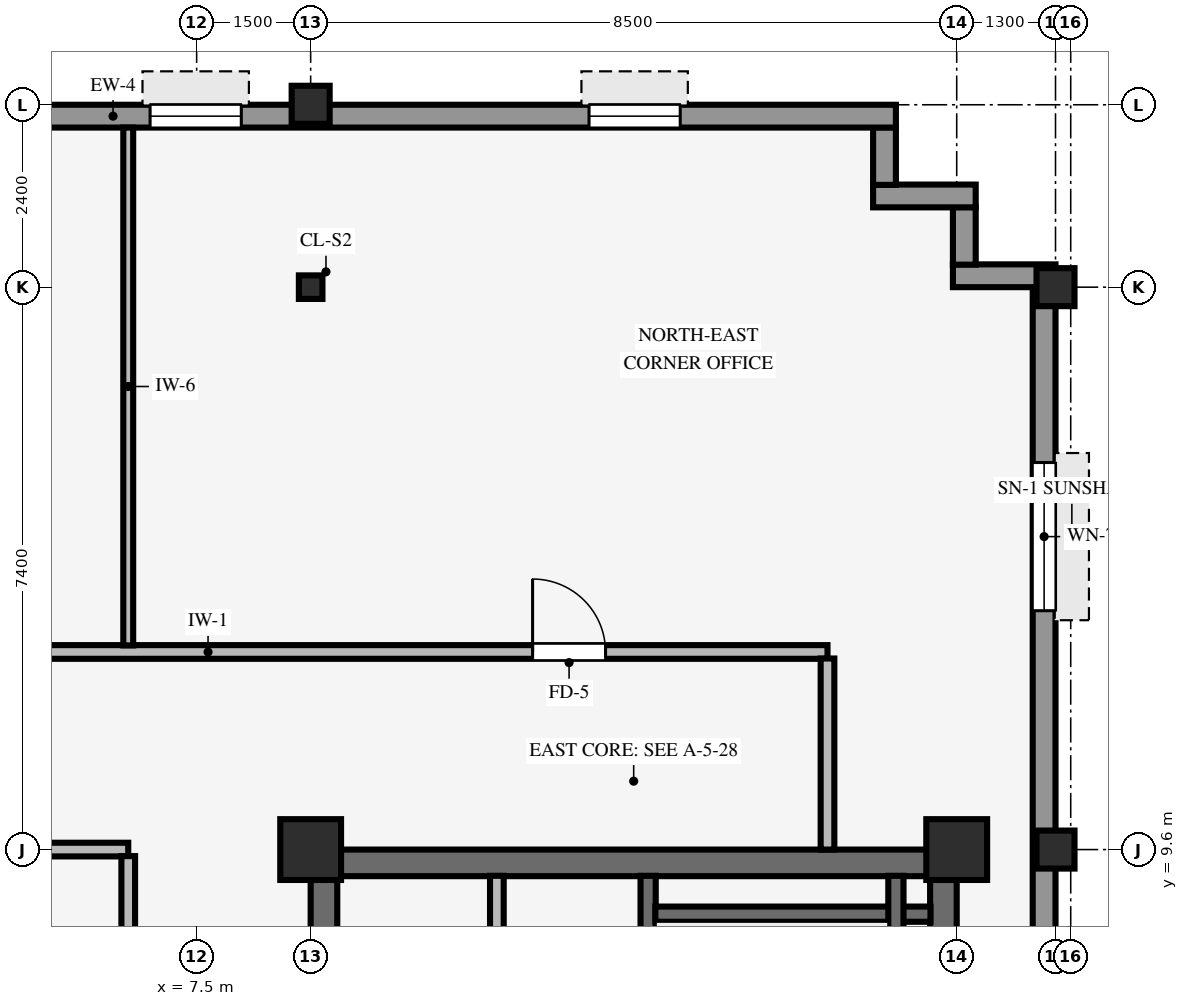
"""IFC4 building model, lengths in metres.
Left out: names, types, materials, properties, quantities, classifications, styles, units other than length and angle.
Written with IfcOpenShell. Run it as: python <this file> out.ifc"""

import sys

from ifc_helpers import new_model, si_unit, direction, frame, frame_2d, origin, origin_2d, place, context, subcontext, project, spatial, rectangle, hollow_rectangle, i_section, extrude, source, transform, mapped, element, fill, save


model = new_model("IFC4")
c1 = context("Model", 3, precision=1e-05, world=origin(), true_north=direction((0.0, 1.0)))
c2 = subcontext(c1, "Body", "Model", "MODEL_VIEW")
j1 = project(units=[si_unit("LENGTHUNIT", "METRE"), si_unit("PLANEANGLEUNIT", "RADIAN")], contexts=[c1])
p1 = place(None, origin())
s1 = spatial("IfcSite", under=j1, at=p1, CompositionType="ELEMENT")
p2 = place(p1, origin())
s2 = spatial("IfcBuilding", under=s1, at=p2, CompositionType="ELEMENT")
p3 = place(p2, frame((0.0, 0.0, 242.0)))
s3 = spatial("IfcBuildingStorey", under=s2, at=p3, CompositionType="ELEMENT", Elevation=242.0)
p4 = place(p3, frame((9.0, 9.425, 0.0), z_axis=(0.0, 0.0, 1.0), x_axis=(1.0, 0.0, 0.0)))
e1 = element("IfcWall", 1, at=p4, inside=s3, PredefinedType="SHEAR", context=c2, shape_type="SweptSolid", body=[
    extrude(rectangle(XDim=8.5, YDim=0.35, at=frame_2d((4.25, 0.0))), origin(), (0.0, 0.0, 1.0), 3.25),
])
p5 = place(p3, frame((9.175, -9.255, 0.0), z_axis=(0.0, 0.0, 1.0), x_axis=(0.0, 1.0, 0.0)))
e2 = element("IfcWall", 2, at=p5, inside=s3, PredefinedType="SHEAR", context=c2, shape_type="SweptSolid", body=[
    extrude(rectangle(XDim=18.51, YDim=0.35, at=frame_2d((9.255, 0.0))), origin(), (0.0, 0.0, 1.0), 3.25),
])
p6 = place(p5, frame((8.655, 0.0, 0.0)))
e3 = element("IfcOpeningElement", 3, at=p6, cuts=e2, PredefinedType="OPENING", context=c2, shape_type="SweptSolid", body=[
    extrude(rectangle(XDim=1.2, YDim=2.15, at=frame_2d((0.6, 1.075))), frame((0.0, 0.185, 0.0), z_axis=(0.0, -1.0, 0.0), x_axis=(1.0, 0.0, 0.0)), (0.0, 0.0, 1.0), 0.37),
])
p7 = place(p3, frame((17.325, -9.255, 0.0), z_axis=(0.0, 0.0, 1.0), x_axis=(0.0, 1.0, 0.0)))
e4 = element("IfcWall", 4, at=p7, inside=s3, PredefinedType="SHEAR", context=c2, shape_type="SweptSolid", body=[
    extrude(rectangle(XDim=18.51, YDim=0.35, at=frame_2d((9.255, 0.0))), origin(), (0.0, 0.0, 1.0), 3.25),
])
for number, where, z_axis, x_axis in (
    (5, (9.0, 9.6, 0.0), (0.0, 0.0, 1.0), (1.0, 0.0, 0.0)),
    (6, (17.5, 9.6, 0.0), (0.0, 0.0, 1.0), (1.0, 0.0, 0.0)),
):
    element("IfcColumn", number, at=place(p3, frame(where, z_axis=z_axis, x_axis=x_axis)), inside=s3, PredefinedType="COLUMN", context=c2, shape_type="SweptSolid", body=[
        extrude(rectangle(XDim=0.8, YDim=0.8, at=origin_2d()), origin(), (0.0, 0.0, 1.0), 3.25),
    ])
for number, where, z_axis, x_axis in (
    (7, (18.8, 9.6, 0.0), (0.0, 0.0, 1.0), (1.0, 0.0, 0.0)),
    (8, (18.8, 17.0, 0.0), (0.0, 0.0, 1.0), (1.0, 0.0, 0.0)),
    (9, (9.0, 19.4, 0.0), (0.0, 0.0, 1.0), (1.0, 0.0, 0.0)),
):
    element("IfcColumn", number, at=place(p3, frame(where, z_axis=z_axis, x_axis=x_axis)), inside=s3, PredefinedType="COLUMN", context=c2, shape_type="SweptSolid", body=[
        extrude(hollow_rectangle(XDim=0.5, YDim=0.5, WallThickness=0.032, InnerFilletRadius=0.032, OuterFilletRadius=0.064, at=origin_2d()), origin(), (0.0, 0.0, 1.0), 3.25),
    ])
p8 = place(p3, frame((9.0, 17.0, 0.0), z_axis=(0.0, 0.0, 1.0), x_axis=(1.0, 0.0, 0.0)))
e10 = element("IfcColumn", 10, at=p8, inside=s3, PredefinedType="COLUMN", context=c2, shape_type="SweptSolid", body=[
    extrude(i_section(OverallWidth=0.31, OverallDepth=0.31, WebThickness=0.015, FlangeThickness=0.015, FilletRadius=0.015, at=origin_2d()), origin(), (0.0, 0.0, 1.0), 3.25),
])
p9 = place(p3, frame((18.65, -17.004, 0.0), z_axis=(0.0, 0.0, 1.0), x_axis=(0.0, 1.0, 0.0)))
e11 = element("IfcWall", 11, at=p9, inside=s3, PredefinedType="STANDARD", context=c2, shape_type="SweptSolid", body=[
    extrude(rectangle(XDim=34.008, YDim=0.3, at=frame_2d((17.004, 0.0))), origin(), (0.0, 0.0, 1.0), 2.585),
])
p10 = place(p9, frame((2.311, 0.0, 0.8)))
e12 = element("IfcOpeningElement", 12, at=p10, cuts=e11, PredefinedType="OPENING", context=c2, shape_type="SweptSolid", body=[
    extrude(rectangle(XDim=1.95, YDim=1.48, at=frame_2d((0.975, 0.74))), frame((0.0, 0.16, 0.0), z_axis=(0.0, -1.0, 0.0), x_axis=(1.0, 0.0, 0.0)), (0.0, 0.0, 1.0), 0.32),
])
p11 = place(p9, frame((29.747, 0.0, 0.8)))
e13 = element("IfcOpeningElement", 13, at=p11, cuts=e11, PredefinedType="OPENING", context=c2, shape_type="SweptSolid", body=[
    extrude(rectangle(XDim=1.95, YDim=1.48, at=frame_2d((0.975, 0.74))), frame((0.0, 0.16, 0.0), z_axis=(0.0, -1.0, 0.0), x_axis=(1.0, 0.0, 0.0)), (0.0, 0.0, 1.0), 0.32),
])
p12 = place(p3, frame((17.45, 17.15, 0.0), z_axis=(0.0, 0.0, 1.0), x_axis=(1.0, 0.0, 0.0)))
e14 = element("IfcWall", 14, at=p12, inside=s3, PredefinedType="STANDARD", context=c2, shape_type="SweptSolid", body=[
    extrude(rectangle(XDim=1.35, YDim=0.3, at=frame_2d((0.675, 0.0))), origin(), (0.0, 0.0, 1.0), 2.772),
])
p13 = place(p3, frame((17.6, 17.296, 0.0), z_axis=(0.0, 0.0, 1.0), x_axis=(0.0, 1.0, 0.0)))
e15 = element("IfcWall", 15, at=p13, inside=s3, PredefinedType="STANDARD", context=c2, shape_type="SweptSolid", body=[
    extrude(rectangle(XDim=0.758, YDim=0.3, at=frame_2d((0.379, 0.0))), origin(), (0.0, 0.0, 1.0), 2.772),
])
p14 = place(p3, frame((16.4, 18.2, 0.0), z_axis=(0.0, 0.0, 1.0), x_axis=(1.0, 0.0, 0.0)))
e16 = element("IfcWall", 16, at=p14, inside=s3, PredefinedType="STANDARD", context=c2, shape_type="SweptSolid", body=[
    extrude(rectangle(XDim=1.35, YDim=0.3, at=frame_2d((0.675, 0.0))), origin(), (0.0, 0.0, 1.0), 2.772),
])
p15 = place(p3, frame((16.55, 18.346, 0.0), z_axis=(0.0, 0.0, 1.0), x_axis=(0.0, 1.0, 0.0)))
e17 = element("IfcWall", 17, at=p15, inside=s3, PredefinedType="STANDARD", context=c2, shape_type="SweptSolid", body=[
    extrude(rectangle(XDim=0.758, YDim=0.3, at=frame_2d((0.379, 0.0))), origin(), (0.0, 0.0, 1.0), 2.772),
])
p16 = place(p3, frame((-24.3, 19.25, 0.0), z_axis=(0.0, 0.0, 1.0), x_axis=(1.0, 0.0, 0.0)))
e18 = element("IfcWall", 18, at=p16, inside=s3, PredefinedType="STANDARD", context=c2, shape_type="SweptSolid", body=[
    extrude(rectangle(XDim=41.0, YDim=0.3, at=frame_2d((20.5, 0.0))), origin(), (0.0, 0.0, 1.0), 2.585),
])
p17 = place(p16, frame((18.9, 0.0, 0.0)))
e19 = element("IfcOpeningElement", 19, at=p17, cuts=e18, PredefinedType="OPENING", context=c2, shape_type="SweptSolid", body=[
    extrude(rectangle(XDim=1.05, YDim=2.1, at=frame_2d((0.525, 1.05))), frame((0.0, 0.16, 0.0), z_axis=(0.0, -1.0, 0.0), x_axis=(1.0, 0.0, 0.0)), (0.0, 0.0, 1.0), 0.32),
])
p18 = place(p16, frame((2.837, 0.0, 0.8)))
e20 = element("IfcOpeningElement", 20, at=p18, cuts=e18, PredefinedType="OPENING", context=c2, shape_type="SweptSolid", body=[
    extrude(rectangle(XDim=1.2, YDim=1.48, at=frame_2d((0.6, 0.74))), frame((0.0, 0.16, 0.0), z_axis=(0.0, -1.0, 0.0), x_axis=(1.0, 0.0, 0.0)), (0.0, 0.0, 1.0), 0.32),
])
p19 = place(p16, frame((7.712, 0.0, 0.8)))
e21 = element("IfcOpeningElement", 21, at=p19, cuts=e18, PredefinedType="OPENING", context=c2, shape_type="SweptSolid", body=[
    extrude(rectangle(XDim=1.2, YDim=1.48, at=frame_2d((0.6, 0.74))), frame((0.0, 0.16, 0.0), z_axis=(0.0, -1.0, 0.0), x_axis=(1.0, 0.0, 0.0)), (0.0, 0.0, 1.0), 0.32),
])
p20 = place(p16, frame((12.587, 0.0, 0.8)))
e22 = element("IfcOpeningElement", 22, at=p20, cuts=e18, PredefinedType="OPENING", context=c2, shape_type="SweptSolid", body=[
    extrude(rectangle(XDim=1.2, YDim=1.48, at=frame_2d((0.6, 0.74))), frame((0.0, 0.16, 0.0), z_axis=(0.0, -1.0, 0.0), x_axis=(1.0, 0.0, 0.0)), (0.0, 0.0, 1.0), 0.32),
])
p21 = place(p16, frame((16.113, 0.0, 0.8)))
e23 = element("IfcOpeningElement", 23, at=p21, cuts=e18, PredefinedType="OPENING", context=c2, shape_type="SweptSolid", body=[
    extrude(rectangle(XDim=1.2, YDim=1.48, at=frame_2d((0.6, 0.74))), frame((0.0, 0.16, 0.0), z_axis=(0.0, -1.0, 0.0), x_axis=(1.0, 0.0, 0.0)), (0.0, 0.0, 1.0), 0.32),
])
p22 = place(p16, frame((21.887, 0.0, 0.8)))
e24 = element("IfcOpeningElement", 24, at=p22, cuts=e18, PredefinedType="OPENING", context=c2, shape_type="SweptSolid", body=[
    extrude(rectangle(XDim=1.2, YDim=1.48, at=frame_2d((0.6, 0.74))), frame((0.0, 0.16, 0.0), z_axis=(0.0, -1.0, 0.0), x_axis=(1.0, 0.0, 0.0)), (0.0, 0.0, 1.0), 0.32),
])
p23 = place(p16, frame((27.212, 0.0, 0.8)))
e25 = element("IfcOpeningElement", 25, at=p23, cuts=e18, PredefinedType="OPENING", context=c2, shape_type="SweptSolid", body=[
    extrude(rectangle(XDim=1.2, YDim=1.48, at=frame_2d((0.6, 0.74))), frame((0.0, 0.16, 0.0), z_axis=(0.0, -1.0, 0.0), x_axis=(1.0, 0.0, 0.0)), (0.0, 0.0, 1.0), 0.32),
])
p24 = place(p16, frame((31.188, 0.0, 0.8)))
e26 = element("IfcOpeningElement", 26, at=p24, cuts=e18, PredefinedType="OPENING", context=c2, shape_type="SweptSolid", body=[
    extrude(rectangle(XDim=1.2, YDim=1.48, at=frame_2d((0.6, 0.74))), frame((0.0, 0.16, 0.0), z_axis=(0.0, -1.0, 0.0), x_axis=(1.0, 0.0, 0.0)), (0.0, 0.0, 1.0), 0.32),
])
p25 = place(p16, frame((36.962, 0.0, 0.8)))
e27 = element("IfcOpeningElement", 27, at=p25, cuts=e18, PredefinedType="OPENING", context=c2, shape_type="SweptSolid", body=[
    extrude(rectangle(XDim=1.2, YDim=1.48, at=frame_2d((0.6, 0.74))), frame((0.0, 0.16, 0.0), z_axis=(0.0, -1.0, 0.0), x_axis=(1.0, 0.0, 0.0)), (0.0, 0.0, 1.0), 0.32),
])
p26 = place(p3, frame((13.44, 0.9, 0.0), z_axis=(0.0, 0.0, 1.0), x_axis=(0.0, 1.0, 0.0)))
e28 = element("IfcWall", 28, at=p26, inside=s3, PredefinedType="SHEAR", context=c2, shape_type="SweptSolid", body=[
    extrude(rectangle(XDim=8.355, YDim=0.2, at=frame_2d((4.177, 0.0))), origin(), (0.0, 0.0, 1.0), 3.25),
])
p27 = place(p26, frame((0.43, 0.0, 0.0)))
e29 = element("IfcOpeningElement", 29, at=p27, cuts=e28, PredefinedType="OPENING", context=c2, shape_type="SweptSolid", body=[
    extrude(rectangle(XDim=1.1, YDim=2.15, at=frame_2d((0.55, 1.075))), frame((0.0, 0.11, 0.0), z_axis=(0.0, -1.0, 0.0), x_axis=(1.0, 0.0, 0.0)), (0.0, 0.0, 1.0), 0.22),
])
p28 = place(p3, frame((13.535, 8.75, 0.0), z_axis=(0.0, 0.0, 1.0), x_axis=(1.0, 0.0, 0.0)))
e30 = element("IfcWall", 30, at=p28, inside=s3, PredefinedType="SHEAR", context=c2, shape_type="SweptSolid", body=[
    extrude(rectangle(XDim=3.62, YDim=0.2, at=frame_2d((1.81, 0.0))), origin(), (0.0, 0.0, 1.0), 3.25),
])
p29 = place(p3, frame((16.7, 1.095, 0.0), z_axis=(0.0, 0.0, 1.0), x_axis=(0.0, 1.0, 0.0)))
e31 = element("IfcWall", 31, at=p29, inside=s3, PredefinedType="SHEAR", context=c2, shape_type="SweptSolid", body=[
    extrude(rectangle(XDim=8.16, YDim=0.2, at=frame_2d((4.08, 0.0))), origin(), (0.0, 0.0, 1.0), 3.25),
])
p30 = place(p3, frame((11.45, 4.19, 0.0), z_axis=(0.0, 0.0, 1.0), x_axis=(0.0, 1.0, 0.0)))
e32 = element("IfcWall", 32, at=p30, inside=s3, PredefinedType="PARTITIONING", context=c2, shape_type="SweptSolid", body=[
    extrude(rectangle(XDim=5.065, YDim=0.18, at=frame_2d((2.532, 0.0))), origin(), (0.0, 0.0, 1.0), 3.24),
])
p31 = place(p3, frame((0.151, 9.6, 0.0), z_axis=(0.0, 0.0, 1.0), x_axis=(1.0, 0.0, 0.0)))
e33 = element("IfcWall", 33, at=p31, inside=s3, PredefinedType="PARTITIONING", context=c2, shape_type="SweptSolid", body=[
    extrude(rectangle(XDim=6.449, YDim=0.18, at=frame_2d((3.225, 0.0))), origin(), (0.0, 0.0, 1.0), 2.285),
])
p32 = place(p3, frame((-9.0, 12.2, 0.0), z_axis=(0.0, 0.0, 1.0), x_axis=(1.0, 0.0, 0.0)))
e34 = element("IfcWall", 34, at=p32, inside=s3, PredefinedType="PARTITIONING", context=c2, shape_type="SweptSolid", body=[
    extrude(rectangle(XDim=24.8, YDim=0.18, at=frame_2d((12.4, 0.0))), origin(), (0.0, 0.0, 1.0), 3.24),
])
p33 = place(p32, frame((11.42, 0.0, 0.0)))
e35 = element("IfcOpeningElement", 35, at=p33, cuts=e34, PredefinedType="OPENING", context=c2, shape_type="SweptSolid", body=[
    extrude(rectangle(XDim=0.96, YDim=2.1, at=frame_2d((0.48, 1.05))), frame((0.0, 0.1, 0.0), z_axis=(0.0, -1.0, 0.0), x_axis=(1.0, 0.0, 0.0)), (0.0, 0.0, 1.0), 0.2),
])
p34 = place(p32, frame((20.92, 0.0, 0.0)))
e36 = element("IfcOpeningElement", 36, at=p34, cuts=e34, PredefinedType="OPENING", context=c2, shape_type="SweptSolid", body=[
    extrude(rectangle(XDim=0.96, YDim=2.1, at=frame_2d((0.48, 1.05))), frame((0.0, 0.1, 0.0), z_axis=(0.0, -1.0, 0.0), x_axis=(1.0, 0.0, 0.0)), (0.0, 0.0, 1.0), 0.2),
])
p35 = place(p32, frame((4.82, 0.0, 0.0)))
e37 = element("IfcOpeningElement", 37, at=p35, cuts=e34, PredefinedType="OPENING", context=c2, shape_type="SweptSolid", body=[
    extrude(rectangle(XDim=0.96, YDim=2.1, at=frame_2d((0.48, 1.05))), frame((0.0, 0.1, 0.0), z_axis=(0.0, -1.0, 0.0), x_axis=(1.0, 0.0, 0.0)), (0.0, 0.0, 1.0), 0.2),
])
p36 = place(p32, frame((0.75, 0.0, 0.0)))
e38 = element("IfcOpeningElement", 38, at=p36, cuts=e34, PredefinedType="OPENING", context=c2, shape_type="SweptSolid", body=[
    extrude(rectangle(XDim=0.9, YDim=2.1, at=frame_2d((0.45, 1.05))), frame((0.0, 0.1, 0.0), z_axis=(0.0, -1.0, 0.0), x_axis=(1.0, 0.0, 0.0)), (0.0, 0.0, 1.0), 0.2),
])
p37 = place(p3, frame((6.6, 1.336, 0.0), z_axis=(0.0, 0.0, 1.0), x_axis=(0.0, 1.0, 0.0)))
e39 = element("IfcWall", 39, at=p37, inside=s3, PredefinedType="PARTITIONING", context=c2, shape_type="SweptSolid", body=[
    extrude(rectangle(XDim=8.178, YDim=0.18, at=frame_2d((4.089, 0.0))), origin(), (0.0, 0.0, 1.0), 3.24),
])
p38 = place(p3, frame((6.6, 12.286, 0.0), z_axis=(0.0, 0.0, 1.0), x_axis=(0.0, 1.0, 0.0)))
e40 = element("IfcWall", 40, at=p38, inside=s3, PredefinedType="PARTITIONING", context=c2, shape_type="SweptSolid", body=[
    extrude(rectangle(XDim=6.814, YDim=0.13, at=frame_2d((3.407, 0.0))), origin(), (0.0, 0.0, 1.0), 3.24),
])
p39 = place(p3, frame((15.8, 9.6, 0.0), z_axis=(0.0, 0.0, 1.0), x_axis=(0.0, 1.0, 0.0)))
e41 = element("IfcWall", 41, at=p39, inside=s3, PredefinedType="PARTITIONING", context=c2, shape_type="SweptSolid", body=[
    extrude(rectangle(XDim=2.514, YDim=0.18, at=frame_2d((1.257, 0.0))), origin(), (0.0, 0.0, 1.0), 3.24),
])
m1 = source(origin(), c2, "Body", "SweptSolid", [
    extrude(rectangle(XDim=1.95, YDim=1.48, at=frame_2d((0.975, 0.74))), frame((0.0, 0.03, 0.0), z_axis=(0.0, -1.0, 0.0), x_axis=(1.0, 0.0, 0.0)), (0.0, 0.0, 1.0), 0.06),
])
p40 = place(p11, origin())
e42 = element("IfcWindow", 42, at=p40, inside=s3, PartitioningType="SINGLE_PANEL", PredefinedType="WINDOW", context=c2, shape_type="MappedRepresentation", body=[
    mapped(m1, transform((0.0, 0.0, 0.0), scale=1.0)),
])
fill(e13, e42)
m2 = source(origin(), c2, "Body", "SweptSolid", [
    extrude(rectangle(XDim=1.2, YDim=1.48, at=frame_2d((0.6, 0.74))), frame((0.0, 0.03, 0.0), z_axis=(0.0, -1.0, 0.0), x_axis=(1.0, 0.0, 0.0)), (0.0, 0.0, 1.0), 0.06),
])
p41 = place(p24, origin())
e43 = element("IfcWindow", 43, at=p41, inside=s3, PartitioningType="SINGLE_PANEL", PredefinedType="WINDOW", context=c2, shape_type="MappedRepresentation", body=[
    mapped(m2, transform((0.0, 0.0, 0.0), scale=1.0)),
])
fill(e26, e43)
p42 = place(p25, origin())
e44 = element("IfcWindow", 44, at=p42, inside=s3, PartitioningType="SINGLE_PANEL", PredefinedType="WINDOW", context=c2, shape_type="MappedRepresentation", body=[
    mapped(m2, transform((0.0, 0.0, 0.0), scale=1.0)),
])
fill(e27, e44)
m3 = source(origin(), c2, "Body", "SweptSolid", [
    extrude(rectangle(XDim=0.96, YDim=2.1, at=frame_2d((0.48, 1.05))), frame((0.0, 0.025, 0.0), z_axis=(0.0, -1.0, 0.0), x_axis=(1.0, 0.0, 0.0)), (0.0, 0.0, 1.0), 0.05),
])
p43 = place(p34, origin())
e45 = element("IfcDoor", 45, at=p43, inside=s3, OperationType="SINGLE_SWING_LEFT", PredefinedType="DOOR", context=c2, shape_type="MappedRepresentation", body=[
    mapped(m3, transform((0.0, 0.0, 0.0), scale=1.0)),
])
fill(e36, e45)
save(model, sys.argv[1])
